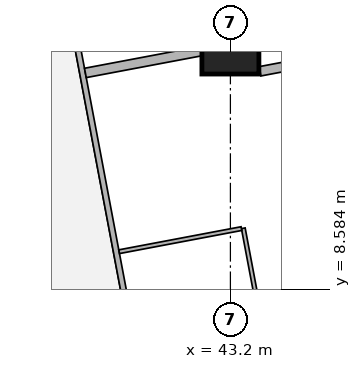
"""IFC4 building model, lengths in metres.
Left out: names, types, materials, properties, quantities, classifications, styles, units other than length and angle.
Written with IfcOpenShell. Run it as: python <this file> out.ifc"""

import sys

from ifc_helpers import new_model, si_unit, direction, frame, frame_2d, origin, origin_2d, place, context, subcontext, project, spatial, rectangle, extrude, element, fill, save


model = new_model("IFC4")
c1 = context("Model", 3, precision=1e-05, world=origin(), true_north=direction((0.0, 1.0)))
c2 = subcontext(c1, "Body", "Model", "MODEL_VIEW")
j1 = project(units=[si_unit("LENGTHUNIT", "METRE"), si_unit("PLANEANGLEUNIT", "RADIAN")], contexts=[c1])
p1 = place(None, origin())
s1 = spatial("IfcSite", under=j1, at=p1, CompositionType="ELEMENT")
p2 = place(p1, origin())
s2 = spatial("IfcBuilding", under=s1, at=p2, CompositionType="ELEMENT")
p3 = place(p2, frame((0.0, 0.0, 147.05)))
s3 = spatial("IfcBuildingStorey", under=s2, at=p3, CompositionType="ELEMENT", Elevation=147.05)
p4 = place(p3, frame((43.2, 15.0, 0.0), z_axis=(0.0, 0.0, 1.0), x_axis=(1.0, 0.0, 0.0)))
e1 = element("IfcColumn", 1, at=p4, inside=s3, PredefinedType="COLUMN", context=c2, shape_type="SweptSolid", body=[
    extrude(rectangle(XDim=1.5, YDim=1.5, at=origin_2d()), origin(), (0.0, 0.0, 1.0), 3.75),
])
p5 = place(p3, frame((50.653, 2.703, 0.0), z_axis=(0.0, 0.0, 1.0), x_axis=(-0.185612026696, 0.982623109613, 0.0)))
e2 = element("IfcWall", 2, at=p5, inside=s3, PredefinedType="SOLIDWALL", context=c2, shape_type="SweptSolid", body=[
    extrude(rectangle(XDim=41.393, YDim=0.2, at=frame_2d((20.697, 0.0))), origin(), (0.0, 0.0, 1.0), 3.5),
])
p6 = place(p5, frame((1.633, 0.0, 0.9)))
e3 = element("IfcOpeningElement", 3, at=p6, cuts=e2, PredefinedType="OPENING", context=c2, shape_type="SweptSolid", body=[
    extrude(rectangle(XDim=1.8, YDim=1.5, at=frame_2d((0.9, 0.75))), frame((0.0, 0.11, 0.0), z_axis=(0.0, -1.0, 0.0), x_axis=(1.0, 0.0, 0.0)), (0.0, 0.0, 1.0), 0.22),
])
p7 = place(p5, frame((6.032, 0.0, 0.9)))
e4 = element("IfcOpeningElement", 4, at=p7, cuts=e2, PredefinedType="OPENING", context=c2, shape_type="SweptSolid", body=[
    extrude(rectangle(XDim=1.8, YDim=1.5, at=frame_2d((0.9, 0.75))), frame((0.0, 0.11, 0.0), z_axis=(0.0, -1.0, 0.0), x_axis=(1.0, 0.0, 0.0)), (0.0, 0.0, 1.0), 0.22),
])
p8 = place(p5, frame((9.848, 0.0, 0.9)))
e5 = element("IfcOpeningElement", 5, at=p8, cuts=e2, PredefinedType="OPENING", context=c2, shape_type="SweptSolid", body=[
    extrude(rectangle(XDim=1.8, YDim=1.5, at=frame_2d((0.9, 0.75))), frame((0.0, 0.11, 0.0), z_axis=(0.0, -1.0, 0.0), x_axis=(1.0, 0.0, 0.0)), (0.0, 0.0, 1.0), 0.22),
])
p9 = place(p5, frame((13.664, 0.0, 0.9)))
e6 = element("IfcOpeningElement", 6, at=p9, cuts=e2, PredefinedType="OPENING", context=c2, shape_type="SweptSolid", body=[
    extrude(rectangle(XDim=1.8, YDim=1.5, at=frame_2d((0.9, 0.75))), frame((0.0, 0.11, 0.0), z_axis=(0.0, -1.0, 0.0), x_axis=(1.0, 0.0, 0.0)), (0.0, 0.0, 1.0), 0.22),
])
p10 = place(p5, frame((17.481, 0.0, 0.9)))
e7 = element("IfcOpeningElement", 7, at=p10, cuts=e2, PredefinedType="OPENING", context=c2, shape_type="SweptSolid", body=[
    extrude(rectangle(XDim=1.8, YDim=1.5, at=frame_2d((0.9, 0.75))), frame((0.0, 0.11, 0.0), z_axis=(0.0, -1.0, 0.0), x_axis=(1.0, 0.0, 0.0)), (0.0, 0.0, 1.0), 0.22),
])
p11 = place(p5, frame((21.297, 0.0, 0.9)))
e8 = element("IfcOpeningElement", 8, at=p11, cuts=e2, PredefinedType="OPENING", context=c2, shape_type="SweptSolid", body=[
    extrude(rectangle(XDim=1.8, YDim=1.5, at=frame_2d((0.9, 0.75))), frame((0.0, 0.11, 0.0), z_axis=(0.0, -1.0, 0.0), x_axis=(1.0, 0.0, 0.0)), (0.0, 0.0, 1.0), 0.22),
])
p12 = place(p5, frame((25.113, 0.0, 0.9)))
e9 = element("IfcOpeningElement", 9, at=p12, cuts=e2, PredefinedType="OPENING", context=c2, shape_type="SweptSolid", body=[
    extrude(rectangle(XDim=1.8, YDim=1.5, at=frame_2d((0.9, 0.75))), frame((0.0, 0.11, 0.0), z_axis=(0.0, -1.0, 0.0), x_axis=(1.0, 0.0, 0.0)), (0.0, 0.0, 1.0), 0.22),
])
p13 = place(p5, frame((28.93, 0.0, 0.9)))
e10 = element("IfcOpeningElement", 10, at=p13, cuts=e2, PredefinedType="OPENING", context=c2, shape_type="SweptSolid", body=[
    extrude(rectangle(XDim=1.8, YDim=1.5, at=frame_2d((0.9, 0.75))), frame((0.0, 0.11, 0.0), z_axis=(0.0, -1.0, 0.0), x_axis=(1.0, 0.0, 0.0)), (0.0, 0.0, 1.0), 0.22),
])
p14 = place(p5, frame((32.746, 0.0, 0.9)))
e11 = element("IfcOpeningElement", 11, at=p14, cuts=e2, PredefinedType="OPENING", context=c2, shape_type="SweptSolid", body=[
    extrude(rectangle(XDim=1.8, YDim=1.5, at=frame_2d((0.9, 0.75))), frame((0.0, 0.11, 0.0), z_axis=(0.0, -1.0, 0.0), x_axis=(1.0, 0.0, 0.0)), (0.0, 0.0, 1.0), 0.22),
])
p15 = place(p5, frame((36.481, 0.0, 0.9)))
e12 = element("IfcOpeningElement", 12, at=p15, cuts=e2, PredefinedType="OPENING", context=c2, shape_type="SweptSolid", body=[
    extrude(rectangle(XDim=1.8, YDim=1.5, at=frame_2d((0.9, 0.75))), frame((0.0, 0.11, 0.0), z_axis=(0.0, -1.0, 0.0), x_axis=(1.0, 0.0, 0.0)), (0.0, 0.0, 1.0), 0.22),
])
p16 = place(p3, frame((33.877, 43.029, 0.0), z_axis=(0.0, 0.0, 1.0), x_axis=(0.185596841028, -0.98262597798, 0.0)))
e13 = element("IfcWall", 13, at=p16, inside=s3, PredefinedType="SOLIDWALL", context=c2, shape_type="SweptSolid", body=[
    extrude(rectangle(XDim=41.66, YDim=0.15, at=frame_2d((20.83, 0.0))), origin(), (0.0, 0.0, 1.0), 2.5),
])
p17 = place(p16, frame((12.57, 0.0, 0.0)))
e14 = element("IfcOpeningElement", 14, at=p17, cuts=e13, PredefinedType="OPENING", context=c2, shape_type="SweptSolid", body=[
    extrude(rectangle(XDim=1.0, YDim=2.1, at=frame_2d((0.5, 1.05))), frame((0.0, 0.085, 0.0), z_axis=(0.0, -1.0, 0.0), x_axis=(1.0, 0.0, 0.0)), (0.0, 0.0, 1.0), 0.17),
])
p18 = place(p16, frame((16.386, 0.0, 0.0)))
e15 = element("IfcOpeningElement", 15, at=p18, cuts=e13, PredefinedType="OPENING", context=c2, shape_type="SweptSolid", body=[
    extrude(rectangle(XDim=1.0, YDim=2.1, at=frame_2d((0.5, 1.05))), frame((0.0, 0.085, 0.0), z_axis=(0.0, -1.0, 0.0), x_axis=(1.0, 0.0, 0.0)), (0.0, 0.0, 1.0), 0.17),
])
p19 = place(p16, frame((31.166, 0.0, 0.0)))
e16 = element("IfcOpeningElement", 16, at=p19, cuts=e13, PredefinedType="OPENING", context=c2, shape_type="SweptSolid", body=[
    extrude(rectangle(XDim=1.0, YDim=2.1, at=frame_2d((0.5, 1.05))), frame((0.0, 0.085, 0.0), z_axis=(0.0, -1.0, 0.0), x_axis=(1.0, 0.0, 0.0)), (0.0, 0.0, 1.0), 0.17),
])
p20 = place(p3, frame((43.539, 10.192, 0.0), z_axis=(0.0, 0.0, 1.0), x_axis=(0.18564540894, -0.982616803306, 0.0)))
e17 = element("IfcWall", 17, at=p20, inside=s3, PredefinedType="PARTITIONING", context=c2, shape_type="SweptSolid", body=[
    extrude(rectangle(XDim=1.966, YDim=0.1, at=frame_2d((0.983, 0.0))), origin(), (0.0, 0.0, 1.0), 3.5),
])
p21 = place(p3, frame((43.49, 10.183, 0.0), z_axis=(0.0, 0.0, 1.0), x_axis=(-0.982607026909, -0.185697147715, 0.0)))
e18 = element("IfcWall", 18, at=p21, inside=s3, PredefinedType="PARTITIONING", context=c2, shape_type="SweptSolid", body=[
    extrude(rectangle(XDim=3.275, YDim=0.1, at=frame_2d((1.637, 0.0))), origin(), (0.0, 0.0, 1.0), 3.5),
])
p22 = place(p21, frame((1.2, 0.0, 0.0)))
e19 = element("IfcOpeningElement", 19, at=p22, cuts=e18, PredefinedType="OPENING", context=c2, shape_type="SweptSolid", body=[
    extrude(rectangle(XDim=0.9, YDim=2.1, at=frame_2d((0.45, 1.05))), frame((0.0, 0.06, 0.0), z_axis=(0.0, -1.0, 0.0), x_axis=(1.0, 0.0, 0.0)), (0.0, 0.0, 1.0), 0.12),
])
p23 = place(p3, frame((45.39, 14.588, 0.0), z_axis=(0.0, 0.0, 1.0), x_axis=(-0.982680951688, -0.18530555089, 0.0)))
e20 = element("IfcWall", 20, at=p23, inside=s3, PredefinedType="SOLIDWALL", context=c2, shape_type="SweptSolid", body=[
    extrude(rectangle(XDim=1.435, YDim=0.25, at=frame_2d((0.717, 0.0))), origin(), (0.0, 0.0, 1.0), 2.1),
])
p24 = place(p3, frame((42.426, 14.853, 0.0), z_axis=(0.0, 0.0, 1.0), x_axis=(-0.982660840416, -0.185412169809, 0.0)))
e21 = element("IfcWall", 21, at=p24, inside=s3, PredefinedType="SOLIDWALL", context=c2, shape_type="SweptSolid", body=[
    extrude(rectangle(XDim=3.096, YDim=0.25, at=frame_2d((1.548, 0.0))), origin(), (0.0, 0.0, 1.0), 3.5),
])
p25 = place(p19, origin())
e22 = element("IfcDoor", 22, at=p25, inside=s3, OperationType="SINGLE_SWING_LEFT", PredefinedType="DOOR", context=c2, shape_type="SweptSolid", body=[
    extrude(rectangle(XDim=1.0, YDim=2.1, at=frame_2d((0.5, 1.05))), frame((0.0, 0.025, 0.0), z_axis=(0.0, -1.0, 0.0), x_axis=(1.0, 0.0, 0.0)), (0.0, 0.0, 1.0), 0.05),
])
fill(e16, e22)
p26 = place(p22, origin())
e23 = element("IfcDoor", 23, at=p26, inside=s3, OperationType="SINGLE_SWING_RIGHT", PredefinedType="DOOR", context=c2, shape_type="SweptSolid", body=[
    extrude(rectangle(XDim=0.9, YDim=2.1, at=frame_2d((0.45, 1.05))), frame((0.0, 0.025, 0.0), z_axis=(0.0, -1.0, 0.0), x_axis=(1.0, 0.0, 0.0)), (0.0, 0.0, 1.0), 0.05),
])
fill(e19, e23)
save(model, sys.argv[1])
